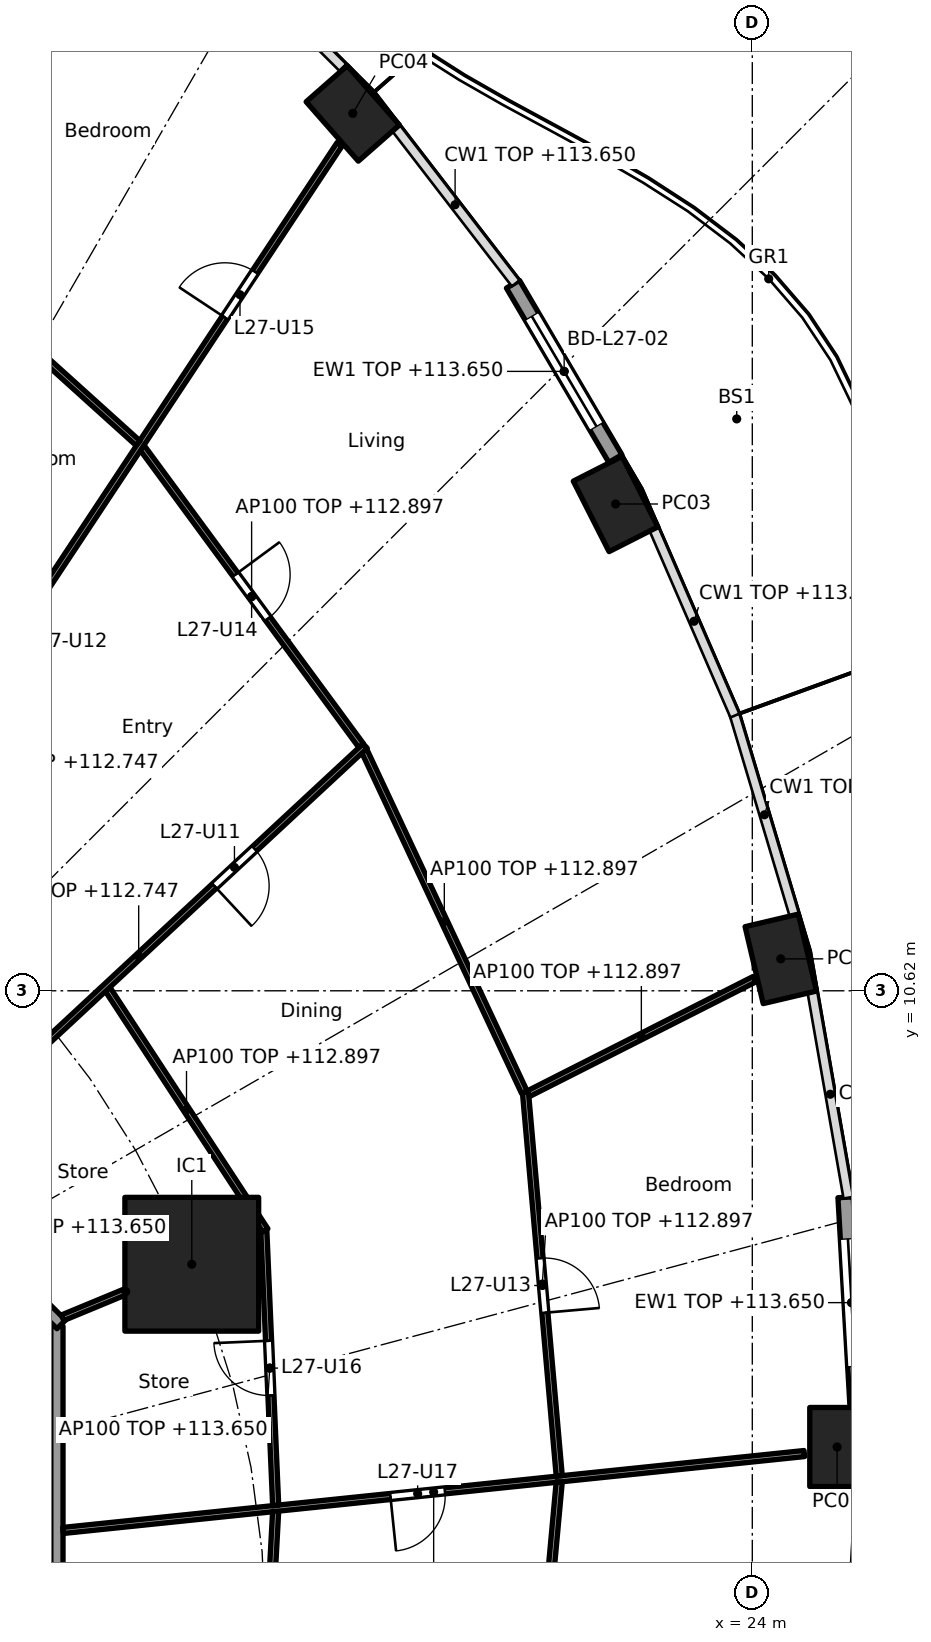
"""IFC4 building model, lengths in metres.
Left out: names, types, materials, properties, quantities, classifications, styles, units other than length and angle.
Written with IfcOpenShell. Run it as: python <this file> out.ifc"""

import sys

from ifc_helpers import new_model, si_unit, direction, frame, frame_2d, origin, origin_2d, place, context, subcontext, project, spatial, rectangle, hollow_rectangle, extrude, element, fill, save


model = new_model("IFC4")
c1 = context("Model", 3, precision=1e-05, world=origin(), true_north=direction((0.0, 1.0)))
c2 = subcontext(c1, "Body", "Model", "MODEL_VIEW")
j1 = project(units=[si_unit("LENGTHUNIT", "METRE"), si_unit("PLANEANGLEUNIT", "RADIAN")], contexts=[c1])
p1 = place(None, origin())
s1 = spatial("IfcSite", under=j1, at=p1, CompositionType="ELEMENT")
p2 = place(p1, origin())
s2 = spatial("IfcBuilding", under=s1, at=p2, CompositionType="ELEMENT")
p3 = place(p2, frame((0.0, 0.0, 110.3)))
s3 = spatial("IfcBuildingStorey", under=s2, at=p3, CompositionType="ELEMENT", Elevation=110.3)
for number, where, z_axis, x_axis in (
    (1, (25.395, 3.118, 0.0), (0.0, 0.0, 1.0), (0.0, 1.0, 0.0)),
    (2, (24.468, 11.145, 0.0), (0.0, 0.0, 1.0), (-0.229, 0.973, 0.0)),
    (3, (21.751, 18.625, 0.0), (0.0, 0.0, 1.0), (-0.452, 0.892, 0.0)),
    (4, (17.43, 25.049, 0.0), (0.0, 0.0, 1.0), (-0.66, 0.751, 0.0)),
):
    element("IfcColumn", number, at=place(p3, frame(where, z_axis=z_axis, x_axis=x_axis)), inside=s3, PredefinedType="COLUMN", context=c2, shape_type="SweptSolid", body=[
        extrude(hollow_rectangle(XDim=1.3, YDim=0.9, WallThickness=0.045, at=origin_2d()), origin(), (0.0, 0.0, 1.0), 3.7),
    ])
p4 = place(p3, frame((14.782, 6.123, 0.0), z_axis=(0.0, 0.0, 1.0), x_axis=(1.0, 0.0, 0.0)))
e5 = element("IfcColumn", 5, at=p4, inside=s3, PredefinedType="COLUMN", context=c2, shape_type="SweptSolid", body=[
    extrude(rectangle(XDim=2.2, YDim=2.2, at=origin_2d()), origin(), (0.0, 0.0, 1.0), 3.7),
])
p5 = place(p3, frame((25.533, 7.224, 0.0), z_axis=(0.0, 0.0, 1.0), x_axis=(0.057546644052, -0.998342818754, 0.0)))
e6 = element("IfcWall", 6, at=p5, inside=s3, PredefinedType="SOLIDWALL", context=c2, shape_type="SweptSolid", body=[
    extrude(rectangle(XDim=3.47, YDim=0.25, at=frame_2d((1.735, 0.0))), origin(), (0.0, 0.0, 1.0), 3.35),
])
p6 = place(p5, frame((0.685, 0.0, 0.0)))
e7 = element("IfcOpeningElement", 7, at=p6, cuts=e6, PredefinedType="OPENING", context=c2, shape_type="SweptSolid", body=[
    extrude(rectangle(XDim=2.1, YDim=2.4, at=frame_2d((1.05, 1.2))), frame((0.0, 0.135, 0.0), z_axis=(0.0, -1.0, 0.0), x_axis=(1.0, 0.0, 0.0)), (0.0, 0.0, 1.0), 0.27),
])
p7 = place(p3, frame((20.064, 22.24, 0.0), z_axis=(0.0, 0.0, 1.0), x_axis=(0.506297921217, -0.862358634775, 0.0)))
e8 = element("IfcWall", 8, at=p7, inside=s3, PredefinedType="SOLIDWALL", context=c2, shape_type="SweptSolid", body=[
    extrude(rectangle(XDim=3.325, YDim=0.25, at=frame_2d((1.662, 0.0))), origin(), (0.0, 0.0, 1.0), 3.35),
])
p8 = place(p7, frame((0.612, 0.0, 0.0)))
e9 = element("IfcOpeningElement", 9, at=p8, cuts=e8, PredefinedType="OPENING", context=c2, shape_type="SweptSolid", body=[
    extrude(rectangle(XDim=2.1, YDim=2.4, at=frame_2d((1.05, 1.2))), frame((0.0, 0.135, 0.0), z_axis=(0.0, -1.0, 0.0), x_axis=(1.0, 0.0, 0.0)), (0.0, 0.0, 1.0), 0.27),
])
p9 = place(p3, frame((12.565, -5.104, 0.0), z_axis=(0.0, 0.0, 1.0), x_axis=(0.0, 1.0, 0.0)))
e10 = element("IfcWall", 10, at=p9, inside=s3, PredefinedType="PARTITIONING", context=c2, shape_type="SweptSolid", body=[
    extrude(rectangle(XDim=10.209, YDim=0.2, at=frame_2d((5.104, 0.0))), origin(), (0.0, 0.0, 1.0), 3.35),
])
p10 = place(p3, frame((12.635, 5.134, 0.0), z_axis=(0.0, 0.0, 1.0), x_axis=(-0.707106781187, 0.707106781187, 0.0)))
e11 = element("IfcWall", 11, at=p10, inside=s3, PredefinedType="PARTITIONING", context=c2, shape_type="SweptSolid", body=[
    extrude(rectangle(XDim=10.609, YDim=0.2, at=frame_2d((5.305, 0.0))), origin(), (0.0, 0.0, 1.0), 3.35),
])
p11 = place(p10, frame((4.804, 0.0, 0.0)))
e12 = element("IfcOpeningElement", 12, at=p11, cuts=e11, PredefinedType="OPENING", context=c2, shape_type="SweptSolid", body=[
    extrude(rectangle(XDim=1.0, YDim=2.1, at=frame_2d((0.5, 1.05))), frame((0.0, 0.11, 0.0), z_axis=(0.0, -1.0, 0.0), x_axis=(1.0, 0.0, 0.0)), (0.0, 0.0, 1.0), 0.22),
])
p12 = place(p3, frame((12.664, 1.745, 0.0), z_axis=(0.0, 0.0, 1.0), x_axis=(0.994662790212, 0.103179134358, 0.0)))
e13 = element("IfcWall", 13, at=p12, inside=s3, PredefinedType="PARTITIONING", context=c2, shape_type="SweptSolid", body=[
    extrude(rectangle(XDim=12.257, YDim=0.1, at=frame_2d((6.128, 0.0))), origin(), (0.0, 0.0, 1.0), 2.447),
])
p13 = place(p12, frame((5.414, 0.0, 0.0)))
e14 = element("IfcOpeningElement", 14, at=p13, cuts=e13, PredefinedType="OPENING", context=c2, shape_type="SweptSolid", body=[
    extrude(rectangle(XDim=0.9, YDim=2.1, at=frame_2d((0.45, 1.05))), frame((0.0, 0.06, 0.0), z_axis=(0.0, -1.0, 0.0), x_axis=(1.0, 0.0, 0.0)), (0.0, 0.0, 1.0), 0.12),
])
p14 = place(p3, frame((16.162, 2.158, 0.0), z_axis=(0.0, 0.0, 1.0), x_axis=(-0.043120653248, 0.999069872063, 0.0)))
e15 = element("IfcWall", 15, at=p14, inside=s3, PredefinedType="PARTITIONING", context=c2, shape_type="SweptSolid", body=[
    extrude(rectangle(XDim=4.518, YDim=0.1, at=frame_2d((2.259, 0.0))), origin(), (0.0, 0.0, 1.0), 3.35),
])
p15 = place(p14, frame((1.809, 0.0, 0.0)))
e16 = element("IfcOpeningElement", 16, at=p15, cuts=e15, PredefinedType="OPENING", context=c2, shape_type="SweptSolid", body=[
    extrude(rectangle(XDim=0.9, YDim=2.1, at=frame_2d((0.45, 1.05))), frame((0.0, 0.06, 0.0), z_axis=(0.0, -1.0, 0.0), x_axis=(1.0, 0.0, 0.0)), (0.0, 0.0, 1.0), 0.12),
])
p16 = place(p3, frame((16.161, 2.058, 0.0), z_axis=(0.0, 0.0, 1.0), x_axis=(-0.053696394729, -0.998557307916, 0.0)))
e17 = element("IfcWall", 17, at=p16, inside=s3, PredefinedType="PARTITIONING", context=c2, shape_type="SweptSolid", body=[
    extrude(rectangle(XDim=4.742, YDim=0.1, at=frame_2d((2.371, 0.0))), origin(), (0.0, 0.0, 1.0), 2.597),
])
p17 = place(p16, frame((1.896, 0.0, 0.0)))
e18 = element("IfcOpeningElement", 18, at=p17, cuts=e17, PredefinedType="OPENING", context=c2, shape_type="SweptSolid", body=[
    extrude(rectangle(XDim=0.9, YDim=2.1, at=frame_2d((0.45, 1.05))), frame((0.0, 0.06, 0.0), z_axis=(0.0, -1.0, 0.0), x_axis=(1.0, 0.0, 0.0)), (0.0, 0.0, 1.0), 0.12),
])
p18 = place(p3, frame((20.825, 2.642, 0.0), z_axis=(0.0, 0.0, 1.0), x_axis=(-0.08776338161, 0.996141349834, 0.0)))
e19 = element("IfcWall", 19, at=p18, inside=s3, PredefinedType="PARTITIONING", context=c2, shape_type="SweptSolid", body=[
    extrude(rectangle(XDim=6.337, YDim=0.1, at=frame_2d((3.168, 0.0))), origin(), (0.0, 0.0, 1.0), 2.597),
])
p19 = place(p18, frame((2.694, 0.0, 0.0)))
e20 = element("IfcOpeningElement", 20, at=p19, cuts=e19, PredefinedType="OPENING", context=c2, shape_type="SweptSolid", body=[
    extrude(rectangle(XDim=0.9, YDim=2.1, at=frame_2d((0.45, 1.05))), frame((0.0, 0.06, 0.0), z_axis=(0.0, -1.0, 0.0), x_axis=(1.0, 0.0, 0.0)), (0.0, 0.0, 1.0), 0.12),
])
p20 = place(p3, frame((20.825, 2.542, 0.0), z_axis=(0.0, 0.0, 1.0), x_axis=(-0.09140211812, -0.995814065377, 0.0)))
e21 = element("IfcWall", 21, at=p20, inside=s3, PredefinedType="PARTITIONING", context=c2, shape_type="SweptSolid", body=[
    extrude(rectangle(XDim=6.403, YDim=0.1, at=frame_2d((3.201, 0.0))), origin(), (0.0, 0.0, 1.0), 2.597),
])
p21 = place(p20, frame((2.726, 0.0, 0.0)))
e22 = element("IfcOpeningElement", 22, at=p21, cuts=e21, PredefinedType="OPENING", context=c2, shape_type="SweptSolid", body=[
    extrude(rectangle(XDim=0.9, YDim=2.1, at=frame_2d((0.45, 1.05))), frame((0.0, 0.06, 0.0), z_axis=(0.0, -1.0, 0.0), x_axis=(1.0, 0.0, 0.0)), (0.0, 0.0, 1.0), 0.12),
])
p22 = place(p3, frame((12.657, 5.243, 0.0), z_axis=(0.0, 0.0, 1.0), x_axis=(0.923864733477, 0.382719158442, 0.0)))
e23 = element("IfcWall", 23, at=p22, inside=s3, PredefinedType="PARTITIONING", context=c2, shape_type="SweptSolid", body=[
    extrude(rectangle(XDim=2.25, YDim=0.1, at=frame_2d((1.125, 0.0))), origin(), (0.0, 0.0, 1.0), 3.35),
])
p23 = place(p3, frame((15.992, 6.68, 0.0), z_axis=(0.0, 0.0, 1.0), x_axis=(-0.547472878942, 0.836823426311, 0.0)))
e24 = element("IfcWall", 24, at=p23, inside=s3, PredefinedType="PARTITIONING", context=c2, shape_type="SweptSolid", body=[
    extrude(rectangle(XDim=4.738, YDim=0.1, at=frame_2d((2.369, 0.0))), origin(), (0.0, 0.0, 1.0), 2.597),
])
p24 = place(p3, frame((20.318, 8.927, 0.0), z_axis=(0.0, 0.0, 1.0), x_axis=(0.892057836959, 0.451921249246, 0.0)))
e25 = element("IfcWall", 25, at=p24, inside=s3, PredefinedType="PARTITIONING", context=c2, shape_type="SweptSolid", body=[
    extrude(rectangle(XDim=4.164, YDim=0.1, at=frame_2d((2.082, 0.0))), origin(), (0.0, 0.0, 1.0), 2.597),
])
p25 = place(p3, frame((20.252, 8.95, 0.0), z_axis=(0.0, 0.0, 1.0), x_axis=(-0.424580052627, 0.90539040138, 0.0)))
e26 = element("IfcWall", 26, at=p25, inside=s3, PredefinedType="PARTITIONING", context=c2, shape_type="SweptSolid", body=[
    extrude(rectangle(XDim=6.204, YDim=0.1, at=frame_2d((3.102, 0.0))), origin(), (0.0, 0.0, 1.0), 2.597),
])
p26 = place(p3, frame((10.185, 7.726, 0.0), z_axis=(0.0, 0.0, 1.0), x_axis=(0.732598472978, 0.680661059112, 0.0)))
e27 = element("IfcWall", 27, at=p26, inside=s3, PredefinedType="PARTITIONING", context=c2, shape_type="SweptSolid", body=[
    extrude(rectangle(XDim=10.167, YDim=0.1, at=frame_2d((5.084, 0.0))), origin(), (0.0, 0.0, 1.0), 2.447),
])
p27 = place(p26, frame((1.725, 0.0, 0.0)))
e28 = element("IfcOpeningElement", 28, at=p27, cuts=e27, PredefinedType="OPENING", context=c2, shape_type="SweptSolid", body=[
    extrude(rectangle(XDim=0.9, YDim=2.1, at=frame_2d((0.45, 1.05))), frame((0.0, 0.06, 0.0), z_axis=(0.0, -1.0, 0.0), x_axis=(1.0, 0.0, 0.0)), (0.0, 0.0, 1.0), 0.12),
])
p28 = place(p26, frame((6.784, 0.0, 0.0)))
e29 = element("IfcOpeningElement", 29, at=p28, cuts=e27, PredefinedType="OPENING", context=c2, shape_type="SweptSolid", body=[
    extrude(rectangle(XDim=0.9, YDim=2.1, at=frame_2d((0.45, 1.05))), frame((0.0, 0.06, 0.0), z_axis=(0.0, -1.0, 0.0), x_axis=(1.0, 0.0, 0.0)), (0.0, 0.0, 1.0), 0.12),
])
p29 = place(p3, frame((17.567, 14.653, 0.0), z_axis=(0.0, 0.0, 1.0), x_axis=(-0.592391983588, 0.80564988536, 0.0)))
e30 = element("IfcWall", 30, at=p29, inside=s3, PredefinedType="PARTITIONING", context=c2, shape_type="SweptSolid", body=[
    extrude(rectangle(XDim=6.08, YDim=0.1, at=frame_2d((3.04, 0.0))), origin(), (0.0, 0.0, 1.0), 2.597),
])
p30 = place(p29, frame((2.59, 0.0, 0.0)))
e31 = element("IfcOpeningElement", 31, at=p30, cuts=e30, PredefinedType="OPENING", context=c2, shape_type="SweptSolid", body=[
    extrude(rectangle(XDim=0.9, YDim=2.1, at=frame_2d((0.45, 1.05))), frame((0.0, 0.06, 0.0), z_axis=(0.0, -1.0, 0.0), x_axis=(1.0, 0.0, 0.0)), (0.0, 0.0, 1.0), 0.12),
])
p31 = place(p3, frame((7.713, 10.195, 0.0), z_axis=(0.0, 0.0, 1.0), x_axis=(0.552111071171, 0.833770571015, 0.0)))
e32 = element("IfcWall", 32, at=p31, inside=s3, PredefinedType="PARTITIONING", context=c2, shape_type="SweptSolid", body=[
    extrude(rectangle(XDim=17.208, YDim=0.1, at=frame_2d((8.604, 0.0))), origin(), (0.0, 0.0, 1.0), 2.447),
])
p32 = place(p31, frame((1.976, 0.0, 0.0)))
e33 = element("IfcOpeningElement", 33, at=p32, cuts=e32, PredefinedType="OPENING", context=c2, shape_type="SweptSolid", body=[
    extrude(rectangle(XDim=0.9, YDim=2.1, at=frame_2d((0.45, 1.05))), frame((0.0, 0.06, 0.0), z_axis=(0.0, -1.0, 0.0), x_axis=(1.0, 0.0, 0.0)), (0.0, 0.0, 1.0), 0.12),
])
p33 = place(p31, frame((7.611, 0.0, 0.0)))
e34 = element("IfcOpeningElement", 34, at=p33, cuts=e32, PredefinedType="OPENING", context=c2, shape_type="SweptSolid", body=[
    extrude(rectangle(XDim=0.9, YDim=2.1, at=frame_2d((0.45, 1.05))), frame((0.0, 0.06, 0.0), z_axis=(0.0, -1.0, 0.0), x_axis=(1.0, 0.0, 0.0)), (0.0, 0.0, 1.0), 0.12),
])
p34 = place(p31, frame((13.79, 0.0, 0.0)))
e35 = element("IfcOpeningElement", 35, at=p34, cuts=e32, PredefinedType="OPENING", context=c2, shape_type="SweptSolid", body=[
    extrude(rectangle(XDim=0.9, YDim=2.1, at=frame_2d((0.45, 1.05))), frame((0.0, 0.06, 0.0), z_axis=(0.0, -1.0, 0.0), x_axis=(1.0, 0.0, 0.0)), (0.0, 0.0, 1.0), 0.12),
])
p35 = place(p3, frame((13.898, 19.625, 0.0), z_axis=(0.0, 0.0, 1.0), x_axis=(-0.742396654702, 0.669960601146, 0.0)))
e36 = element("IfcWall", 36, at=p35, inside=s3, PredefinedType="PARTITIONING", context=c2, shape_type="SweptSolid", body=[
    extrude(rectangle(XDim=5.861, YDim=0.1, at=frame_2d((2.931, 0.0))), origin(), (0.0, 0.0, 1.0), 2.597),
])
p36 = place(p35, frame((3.958, 0.0, 0.0)))
e37 = element("IfcOpeningElement", 37, at=p36, cuts=e36, PredefinedType="OPENING", context=c2, shape_type="SweptSolid", body=[
    extrude(rectangle(XDim=0.9, YDim=2.1, at=frame_2d((0.45, 1.05))), frame((0.0, 0.06, 0.0), z_axis=(0.0, -1.0, 0.0), x_axis=(1.0, 0.0, 0.0)), (0.0, 0.0, 1.0), 0.12),
])
p37 = place(p6, origin())
e38 = element("IfcDoor", 38, at=p37, inside=s3, OperationType="SLIDING_TO_LEFT", PredefinedType="DOOR", context=c2, shape_type="SweptSolid", body=[
    extrude(rectangle(XDim=2.1, YDim=2.4, at=frame_2d((1.05, 1.2))), frame((0.0, 0.025, 0.0), z_axis=(0.0, -1.0, 0.0), x_axis=(1.0, 0.0, 0.0)), (0.0, 0.0, 1.0), 0.05),
])
fill(e7, e38)
p38 = place(p8, origin())
e39 = element("IfcDoor", 39, at=p38, inside=s3, OperationType="SLIDING_TO_LEFT", PredefinedType="DOOR", context=c2, shape_type="SweptSolid", body=[
    extrude(rectangle(XDim=2.1, YDim=2.4, at=frame_2d((1.05, 1.2))), frame((0.0, 0.025, 0.0), z_axis=(0.0, -1.0, 0.0), x_axis=(1.0, 0.0, 0.0)), (0.0, 0.0, 1.0), 0.05),
])
fill(e9, e39)
p39 = place(p28, frame((0.9, 0.0, 0.0), x_axis=(-1.0, 0.0, 0.0)))
e40 = element("IfcDoor", 40, at=p39, inside=s3, OperationType="SINGLE_SWING_RIGHT", PredefinedType="DOOR", context=c2, shape_type="SweptSolid", body=[
    extrude(rectangle(XDim=0.9, YDim=2.1, at=frame_2d((0.45, 1.05))), frame((0.0, 0.025, 0.0), z_axis=(0.0, -1.0, 0.0), x_axis=(1.0, 0.0, 0.0)), (0.0, 0.0, 1.0), 0.05),
])
fill(e29, e40)
p40 = place(p19, frame((0.9, 0.0, 0.0), x_axis=(-1.0, 0.0, 0.0)))
e41 = element("IfcDoor", 41, at=p40, inside=s3, OperationType="SINGLE_SWING_RIGHT", PredefinedType="DOOR", context=c2, shape_type="SweptSolid", body=[
    extrude(rectangle(XDim=0.9, YDim=2.1, at=frame_2d((0.45, 1.05))), frame((0.0, 0.025, 0.0), z_axis=(0.0, -1.0, 0.0), x_axis=(1.0, 0.0, 0.0)), (0.0, 0.0, 1.0), 0.05),
])
fill(e20, e41)
p41 = place(p30, frame((0.9, 0.0, 0.0), x_axis=(-1.0, 0.0, 0.0)))
e42 = element("IfcDoor", 42, at=p41, inside=s3, OperationType="SINGLE_SWING_LEFT", PredefinedType="DOOR", context=c2, shape_type="SweptSolid", body=[
    extrude(rectangle(XDim=0.9, YDim=2.1, at=frame_2d((0.45, 1.05))), frame((0.0, 0.025, 0.0), z_axis=(0.0, -1.0, 0.0), x_axis=(1.0, 0.0, 0.0)), (0.0, 0.0, 1.0), 0.05),
])
fill(e31, e42)
p42 = place(p34, origin())
e43 = element("IfcDoor", 43, at=p42, inside=s3, OperationType="SINGLE_SWING_LEFT", PredefinedType="DOOR", context=c2, shape_type="SweptSolid", body=[
    extrude(rectangle(XDim=0.9, YDim=2.1, at=frame_2d((0.45, 1.05))), frame((0.0, 0.025, 0.0), z_axis=(0.0, -1.0, 0.0), x_axis=(1.0, 0.0, 0.0)), (0.0, 0.0, 1.0), 0.05),
])
fill(e35, e43)
p43 = place(p15, origin())
e44 = element("IfcDoor", 44, at=p43, inside=s3, OperationType="SINGLE_SWING_RIGHT", PredefinedType="DOOR", context=c2, shape_type="SweptSolid", body=[
    extrude(rectangle(XDim=0.9, YDim=2.1, at=frame_2d((0.45, 1.05))), frame((0.0, 0.025, 0.0), z_axis=(0.0, -1.0, 0.0), x_axis=(1.0, 0.0, 0.0)), (0.0, 0.0, 1.0), 0.05),
])
fill(e16, e44)
p44 = place(p13, frame((0.9, 0.0, 0.0), x_axis=(-1.0, 0.0, 0.0)))
e45 = element("IfcDoor", 45, at=p44, inside=s3, OperationType="SINGLE_SWING_RIGHT", PredefinedType="DOOR", context=c2, shape_type="SweptSolid", body=[
    extrude(rectangle(XDim=0.9, YDim=2.1, at=frame_2d((0.45, 1.05))), frame((0.0, 0.025, 0.0), z_axis=(0.0, -1.0, 0.0), x_axis=(1.0, 0.0, 0.0)), (0.0, 0.0, 1.0), 0.05),
])
fill(e14, e45)
save(model, sys.argv[1])
